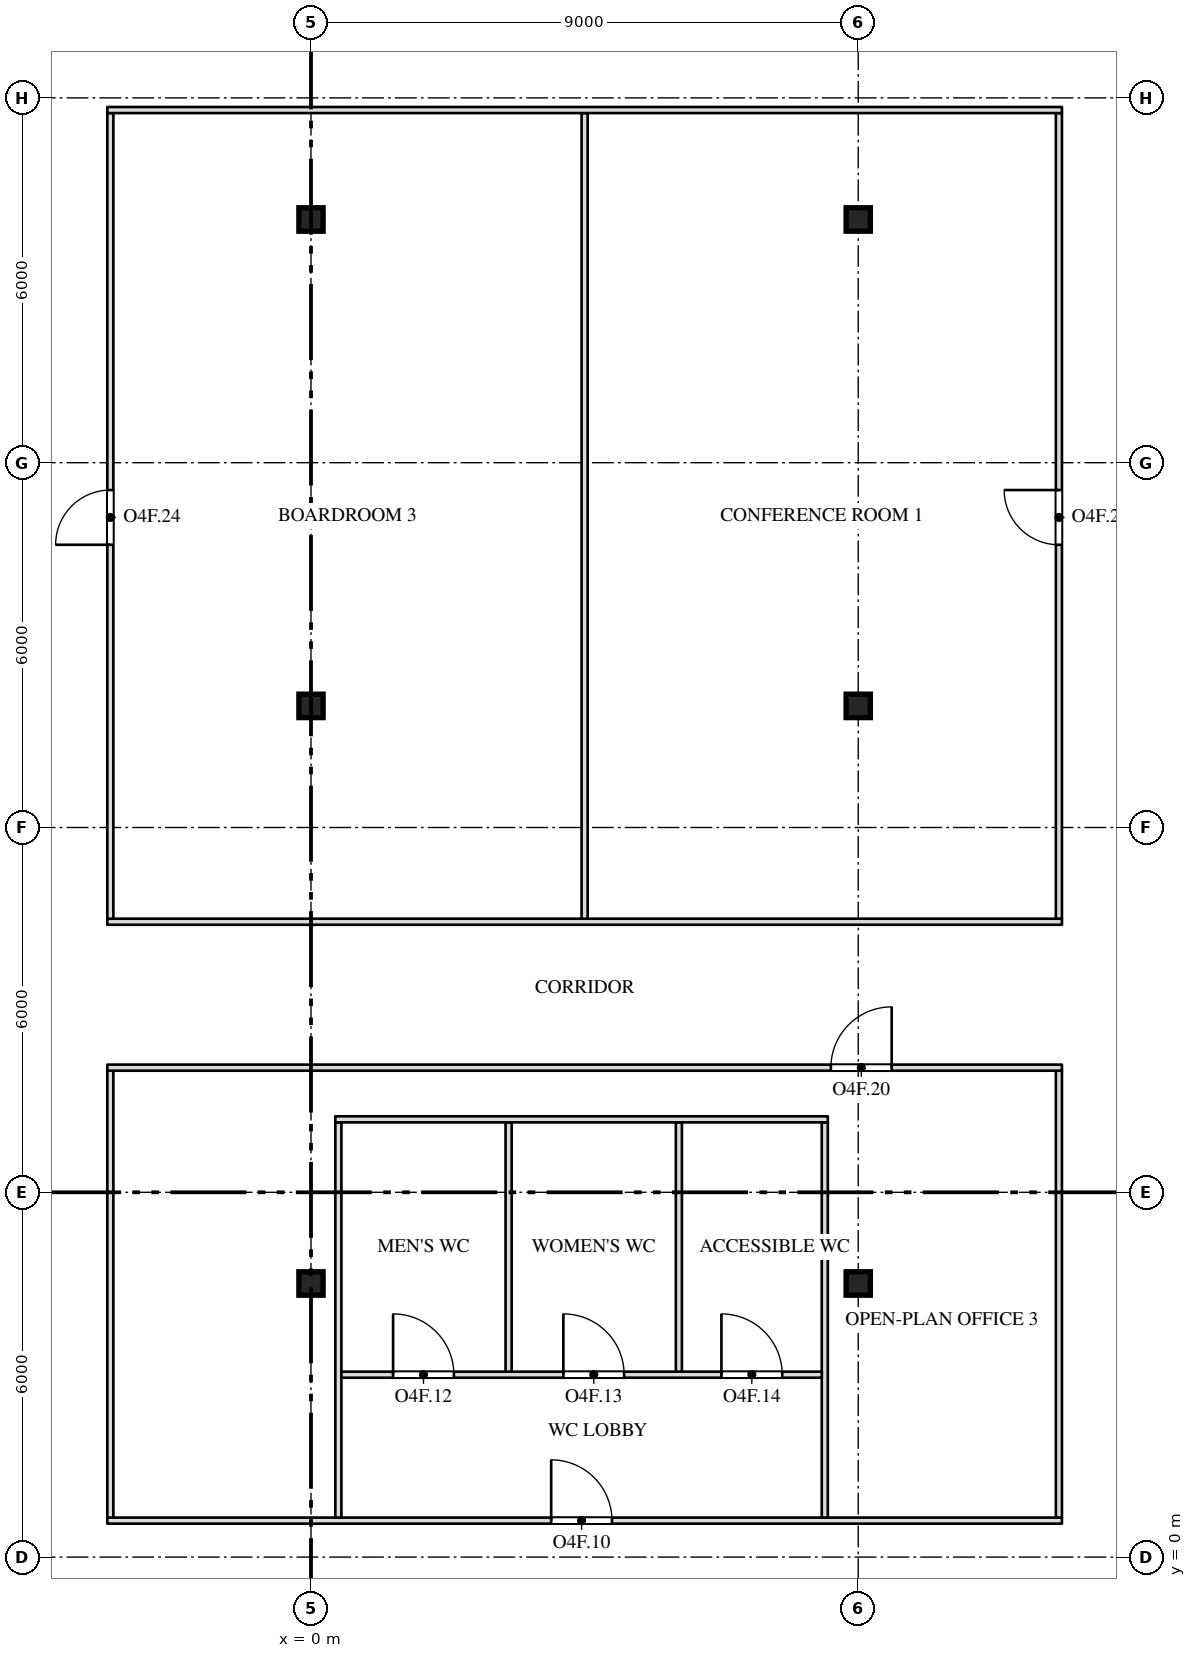
"""IFC4 building model, lengths in metres.
Left out: names, types, materials, properties, quantities, classifications, styles, units other than length and angle.
Written with IfcOpenShell. Run it as: python <this file> out.ifc"""

import sys

from ifc_helpers import new_model, si_unit, direction, frame, frame_2d, origin, origin_2d, place, context, subcontext, project, spatial, rectangle, i_section, extrude, element, fill, save


model = new_model("IFC4")
c1 = context("Model", 3, precision=1e-05, world=origin(), true_north=direction((0.0, 1.0)))
c2 = subcontext(c1, "Body", "Model", "MODEL_VIEW")
j1 = project(units=[si_unit("LENGTHUNIT", "METRE"), si_unit("PLANEANGLEUNIT", "RADIAN")], contexts=[c1])
p1 = place(None, origin())
s1 = spatial("IfcSite", under=j1, at=p1, CompositionType="ELEMENT")
p2 = place(p1, origin())
s2 = spatial("IfcBuilding", under=s1, at=p2, CompositionType="ELEMENT")
p3 = place(p2, frame((0.0, 0.0, 260.5)))
s3 = spatial("IfcBuildingStorey", under=s2, at=p3, CompositionType="ELEMENT", Elevation=260.5)
for number, where, z_axis, x_axis in (
    (1, (0.0, 4.5, 0.0), (0.0, 0.0, 1.0), (1.0, 0.0, 0.0)),
    (2, (9.0, 4.5, 0.0), (0.0, 0.0, 1.0), (1.0, 0.0, 0.0)),
    (3, (0.0, 14.0, 0.0), (0.0, 0.0, 1.0), (1.0, 0.0, 0.0)),
    (4, (9.0, 14.0, 0.0), (0.0, 0.0, 1.0), (1.0, 0.0, 0.0)),
    (5, (0.0, 22.0, 0.0), (0.0, 0.0, 1.0), (1.0, 0.0, 0.0)),
    (6, (9.0, 22.0, 0.0), (0.0, 0.0, 1.0), (1.0, 0.0, 0.0)),
):
    element("IfcColumn", number, at=place(p3, frame(where, z_axis=z_axis, x_axis=x_axis)), inside=s3, PredefinedType="COLUMN", context=c2, shape_type="SweptSolid", body=[
        extrude(i_section(OverallWidth=0.399, OverallDepth=0.386, WebThickness=0.021, FlangeThickness=0.033, at=origin_2d()), origin(), (0.0, 0.0, 1.0), 4.0),
    ])
p4 = place(p3, frame((-3.35, 0.6, 0.0), z_axis=(0.0, 0.0, 1.0), x_axis=(1.0, 0.0, 0.0)))
e7 = element("IfcWall", 7, at=p4, inside=s3, PredefinedType="PARTITIONING", context=c2, shape_type="SweptSolid", body=[
    extrude(rectangle(XDim=15.7, YDim=0.1, at=frame_2d((7.85, 0.0))), origin(), (0.0, 0.0, 1.0), 3.7),
])
p5 = place(p4, frame((7.3, 0.0, 0.0)))
e8 = element("IfcOpeningElement", 8, at=p5, cuts=e7, PredefinedType="OPENING", context=c2, shape_type="SweptSolid", body=[
    extrude(rectangle(XDim=1.0, YDim=2.1, at=frame_2d((0.5, 1.05))), frame((0.0, 0.062, 0.0), z_axis=(0.0, -1.0, 0.0), x_axis=(1.0, 0.0, 0.0)), (0.0, 0.0, 1.0), 0.124),
])
p6 = place(p3, frame((-3.3, 0.65, 0.0), z_axis=(0.0, 0.0, 1.0), x_axis=(0.0, 1.0, 0.0)))
e9 = element("IfcWall", 9, at=p6, inside=s3, PredefinedType="PARTITIONING", context=c2, shape_type="SweptSolid", body=[
    extrude(rectangle(XDim=7.35, YDim=0.1, at=frame_2d((3.675, 0.0))), origin(), (0.0, 0.0, 1.0), 3.7),
])
for number, where, z_axis, x_axis in (
    (10, (0.45, 0.65, 0.0), (0.0, 0.0, 1.0), (0.0, 1.0, 0.0)),
    (11, (8.45, 0.65, 0.0), (0.0, 0.0, 1.0), (0.0, 1.0, 0.0)),
):
    element("IfcWall", number, at=place(p3, frame(where, z_axis=z_axis, x_axis=x_axis)), inside=s3, PredefinedType="PARTITIONING", context=c2, shape_type="SweptSolid", body=[
        extrude(rectangle(XDim=6.5, YDim=0.1, at=frame_2d((3.25, 0.0))), origin(), (0.0, 0.0, 1.0), 3.7),
    ])
p7 = place(p3, frame((12.3, 0.65, 0.0), z_axis=(0.0, 0.0, 1.0), x_axis=(0.0, 1.0, 0.0)))
e12 = element("IfcWall", 12, at=p7, inside=s3, PredefinedType="PARTITIONING", context=c2, shape_type="SweptSolid", body=[
    extrude(rectangle(XDim=7.35, YDim=0.1, at=frame_2d((3.675, 0.0))), origin(), (0.0, 0.0, 1.0), 3.7),
])
p8 = place(p3, frame((0.5, 3.0, 0.0), z_axis=(0.0, 0.0, 1.0), x_axis=(1.0, 0.0, 0.0)))
e13 = element("IfcWall", 13, at=p8, inside=s3, PredefinedType="PARTITIONING", context=c2, shape_type="SweptSolid", body=[
    extrude(rectangle(XDim=7.9, YDim=0.1, at=frame_2d((3.95, 0.0))), origin(), (0.0, 0.0, 1.0), 3.7),
])
p9 = place(p8, frame((0.85, 0.0, 0.0)))
e14 = element("IfcOpeningElement", 14, at=p9, cuts=e13, PredefinedType="OPENING", context=c2, shape_type="SweptSolid", body=[
    extrude(rectangle(XDim=1.0, YDim=2.1, at=frame_2d((0.5, 1.05))), frame((0.0, 0.062, 0.0), z_axis=(0.0, -1.0, 0.0), x_axis=(1.0, 0.0, 0.0)), (0.0, 0.0, 1.0), 0.124),
])
p10 = place(p8, frame((3.65, 0.0, 0.0)))
e15 = element("IfcOpeningElement", 15, at=p10, cuts=e13, PredefinedType="OPENING", context=c2, shape_type="SweptSolid", body=[
    extrude(rectangle(XDim=1.0, YDim=2.1, at=frame_2d((0.5, 1.05))), frame((0.0, 0.062, 0.0), z_axis=(0.0, -1.0, 0.0), x_axis=(1.0, 0.0, 0.0)), (0.0, 0.0, 1.0), 0.124),
])
p11 = place(p8, frame((6.25, 0.0, 0.0)))
e16 = element("IfcOpeningElement", 16, at=p11, cuts=e13, PredefinedType="OPENING", context=c2, shape_type="SweptSolid", body=[
    extrude(rectangle(XDim=1.0, YDim=2.1, at=frame_2d((0.5, 1.05))), frame((0.0, 0.062, 0.0), z_axis=(0.0, -1.0, 0.0), x_axis=(1.0, 0.0, 0.0)), (0.0, 0.0, 1.0), 0.124),
])
for number, where, z_axis, x_axis in (
    (17, (3.25, 3.05, 0.0), (0.0, 0.0, 1.0), (0.0, 1.0, 0.0)),
    (18, (6.05, 3.05, 0.0), (0.0, 0.0, 1.0), (0.0, 1.0, 0.0)),
):
    element("IfcWall", number, at=place(p3, frame(where, z_axis=z_axis, x_axis=x_axis)), inside=s3, PredefinedType="PARTITIONING", context=c2, shape_type="SweptSolid", body=[
        extrude(rectangle(XDim=4.1, YDim=0.1, at=frame_2d((2.05, 0.0))), origin(), (0.0, 0.0, 1.0), 3.7),
    ])
p12 = place(p3, frame((0.4, 7.2, 0.0), z_axis=(0.0, 0.0, 1.0), x_axis=(1.0, 0.0, 0.0)))
e19 = element("IfcWall", 19, at=p12, inside=s3, PredefinedType="PARTITIONING", context=c2, shape_type="SweptSolid", body=[
    extrude(rectangle(XDim=8.1, YDim=0.1, at=frame_2d((4.05, 0.0))), origin(), (0.0, 0.0, 1.0), 3.7),
])
p13 = place(p3, frame((-3.35, 8.05, 0.0), z_axis=(0.0, 0.0, 1.0), x_axis=(1.0, 0.0, 0.0)))
e20 = element("IfcWall", 20, at=p13, inside=s3, PredefinedType="PARTITIONING", context=c2, shape_type="SweptSolid", body=[
    extrude(rectangle(XDim=15.7, YDim=0.1, at=frame_2d((7.85, 0.0))), origin(), (0.0, 0.0, 1.0), 3.7),
])
p14 = place(p13, frame((11.9, 0.0, 0.0)))
e21 = element("IfcOpeningElement", 21, at=p14, cuts=e20, PredefinedType="OPENING", context=c2, shape_type="SweptSolid", body=[
    extrude(rectangle(XDim=1.0, YDim=2.1, at=frame_2d((0.5, 1.05))), frame((0.0, 0.062, 0.0), z_axis=(0.0, -1.0, 0.0), x_axis=(1.0, 0.0, 0.0)), (0.0, 0.0, 1.0), 0.124),
])
p15 = place(p3, frame((-3.35, 10.45, 0.0), z_axis=(0.0, 0.0, 1.0), x_axis=(1.0, 0.0, 0.0)))
e22 = element("IfcWall", 22, at=p15, inside=s3, PredefinedType="PARTITIONING", context=c2, shape_type="SweptSolid", body=[
    extrude(rectangle(XDim=15.7, YDim=0.1, at=frame_2d((7.85, 0.0))), origin(), (0.0, 0.0, 1.0), 3.7),
])
p16 = place(p3, frame((-3.3, 10.5, 0.0), z_axis=(0.0, 0.0, 1.0), x_axis=(0.0, 1.0, 0.0)))
e23 = element("IfcWall", 23, at=p16, inside=s3, PredefinedType="PARTITIONING", context=c2, shape_type="SweptSolid", body=[
    extrude(rectangle(XDim=13.25, YDim=0.1, at=frame_2d((6.625, 0.0))), origin(), (0.0, 0.0, 1.0), 3.7),
])
p17 = place(p16, frame((6.15, 0.0, 0.0)))
e24 = element("IfcOpeningElement", 24, at=p17, cuts=e23, PredefinedType="OPENING", context=c2, shape_type="SweptSolid", body=[
    extrude(rectangle(XDim=0.9, YDim=2.1, at=frame_2d((0.45, 1.05))), frame((0.0, 0.062, 0.0), z_axis=(0.0, -1.0, 0.0), x_axis=(1.0, 0.0, 0.0)), (0.0, 0.0, 1.0), 0.124),
])
p18 = place(p3, frame((4.5, 10.5, 0.0), z_axis=(0.0, 0.0, 1.0), x_axis=(0.0, 1.0, 0.0)))
e25 = element("IfcWall", 25, at=p18, inside=s3, PredefinedType="PARTITIONING", context=c2, shape_type="SweptSolid", body=[
    extrude(rectangle(XDim=13.25, YDim=0.1, at=frame_2d((6.625, 0.0))), origin(), (0.0, 0.0, 1.0), 3.101),
])
p19 = place(p3, frame((12.3, 10.5, 0.0), z_axis=(0.0, 0.0, 1.0), x_axis=(0.0, 1.0, 0.0)))
e26 = element("IfcWall", 26, at=p19, inside=s3, PredefinedType="PARTITIONING", context=c2, shape_type="SweptSolid", body=[
    extrude(rectangle(XDim=13.25, YDim=0.1, at=frame_2d((6.625, 0.0))), origin(), (0.0, 0.0, 1.0), 3.7),
])
p20 = place(p19, frame((6.15, 0.0, 0.0)))
e27 = element("IfcOpeningElement", 27, at=p20, cuts=e26, PredefinedType="OPENING", context=c2, shape_type="SweptSolid", body=[
    extrude(rectangle(XDim=0.9, YDim=2.1, at=frame_2d((0.45, 1.05))), frame((0.0, 0.062, 0.0), z_axis=(0.0, -1.0, 0.0), x_axis=(1.0, 0.0, 0.0)), (0.0, 0.0, 1.0), 0.124),
])
p21 = place(p3, frame((-3.35, 23.8, 0.0), z_axis=(0.0, 0.0, 1.0), x_axis=(1.0, 0.0, 0.0)))
e28 = element("IfcWall", 28, at=p21, inside=s3, PredefinedType="PARTITIONING", context=c2, shape_type="SweptSolid", body=[
    extrude(rectangle(XDim=15.7, YDim=0.1, at=frame_2d((7.85, 0.0))), origin(), (0.0, 0.0, 1.0), 3.7),
])
p22 = place(p5, origin())
e29 = element("IfcDoor", 29, at=p22, inside=s3, OperationType="SINGLE_SWING_LEFT", PredefinedType="DOOR", context=c2, shape_type="SweptSolid", body=[
    extrude(rectangle(XDim=1.0, YDim=2.1, at=frame_2d((0.5, 1.05))), frame((0.0, 0.025, 0.0), z_axis=(0.0, -1.0, 0.0), x_axis=(1.0, 0.0, 0.0)), (0.0, 0.0, 1.0), 0.05),
])
fill(e8, e29)
p23 = place(p9, origin())
e30 = element("IfcDoor", 30, at=p23, inside=s3, OperationType="SINGLE_SWING_LEFT", PredefinedType="DOOR", context=c2, shape_type="SweptSolid", body=[
    extrude(rectangle(XDim=1.0, YDim=2.1, at=frame_2d((0.5, 1.05))), frame((0.0, 0.025, 0.0), z_axis=(0.0, -1.0, 0.0), x_axis=(1.0, 0.0, 0.0)), (0.0, 0.0, 1.0), 0.05),
])
fill(e14, e30)
p24 = place(p10, origin())
e31 = element("IfcDoor", 31, at=p24, inside=s3, OperationType="SINGLE_SWING_LEFT", PredefinedType="DOOR", context=c2, shape_type="SweptSolid", body=[
    extrude(rectangle(XDim=1.0, YDim=2.1, at=frame_2d((0.5, 1.05))), frame((0.0, 0.025, 0.0), z_axis=(0.0, -1.0, 0.0), x_axis=(1.0, 0.0, 0.0)), (0.0, 0.0, 1.0), 0.05),
])
fill(e15, e31)
p25 = place(p11, origin())
e32 = element("IfcDoor", 32, at=p25, inside=s3, OperationType="SINGLE_SWING_LEFT", PredefinedType="DOOR", context=c2, shape_type="SweptSolid", body=[
    extrude(rectangle(XDim=1.0, YDim=2.1, at=frame_2d((0.5, 1.05))), frame((0.0, 0.025, 0.0), z_axis=(0.0, -1.0, 0.0), x_axis=(1.0, 0.0, 0.0)), (0.0, 0.0, 1.0), 0.05),
])
fill(e16, e32)
p26 = place(p14, origin())
e33 = element("IfcDoor", 33, at=p26, inside=s3, OperationType="SINGLE_SWING_RIGHT", PredefinedType="DOOR", context=c2, shape_type="SweptSolid", body=[
    extrude(rectangle(XDim=1.0, YDim=2.1, at=frame_2d((0.5, 1.05))), frame((0.0, 0.025, 0.0), z_axis=(0.0, -1.0, 0.0), x_axis=(1.0, 0.0, 0.0)), (0.0, 0.0, 1.0), 0.05),
])
fill(e21, e33)
p27 = place(p17, origin())
e34 = element("IfcDoor", 34, at=p27, inside=s3, OperationType="SINGLE_SWING_LEFT", PredefinedType="DOOR", context=c2, shape_type="SweptSolid", body=[
    extrude(rectangle(XDim=0.9, YDim=2.1, at=frame_2d((0.45, 1.05))), frame((0.0, 0.025, 0.0), z_axis=(0.0, -1.0, 0.0), x_axis=(1.0, 0.0, 0.0)), (0.0, 0.0, 1.0), 0.05),
])
fill(e24, e34)
p28 = place(p20, origin())
e35 = element("IfcDoor", 35, at=p28, inside=s3, OperationType="SINGLE_SWING_RIGHT", PredefinedType="DOOR", context=c2, shape_type="SweptSolid", body=[
    extrude(rectangle(XDim=0.9, YDim=2.1, at=frame_2d((0.45, 1.05))), frame((0.0, 0.025, 0.0), z_axis=(0.0, -1.0, 0.0), x_axis=(1.0, 0.0, 0.0)), (0.0, 0.0, 1.0), 0.05),
])
fill(e27, e35)
save(model, sys.argv[1])
